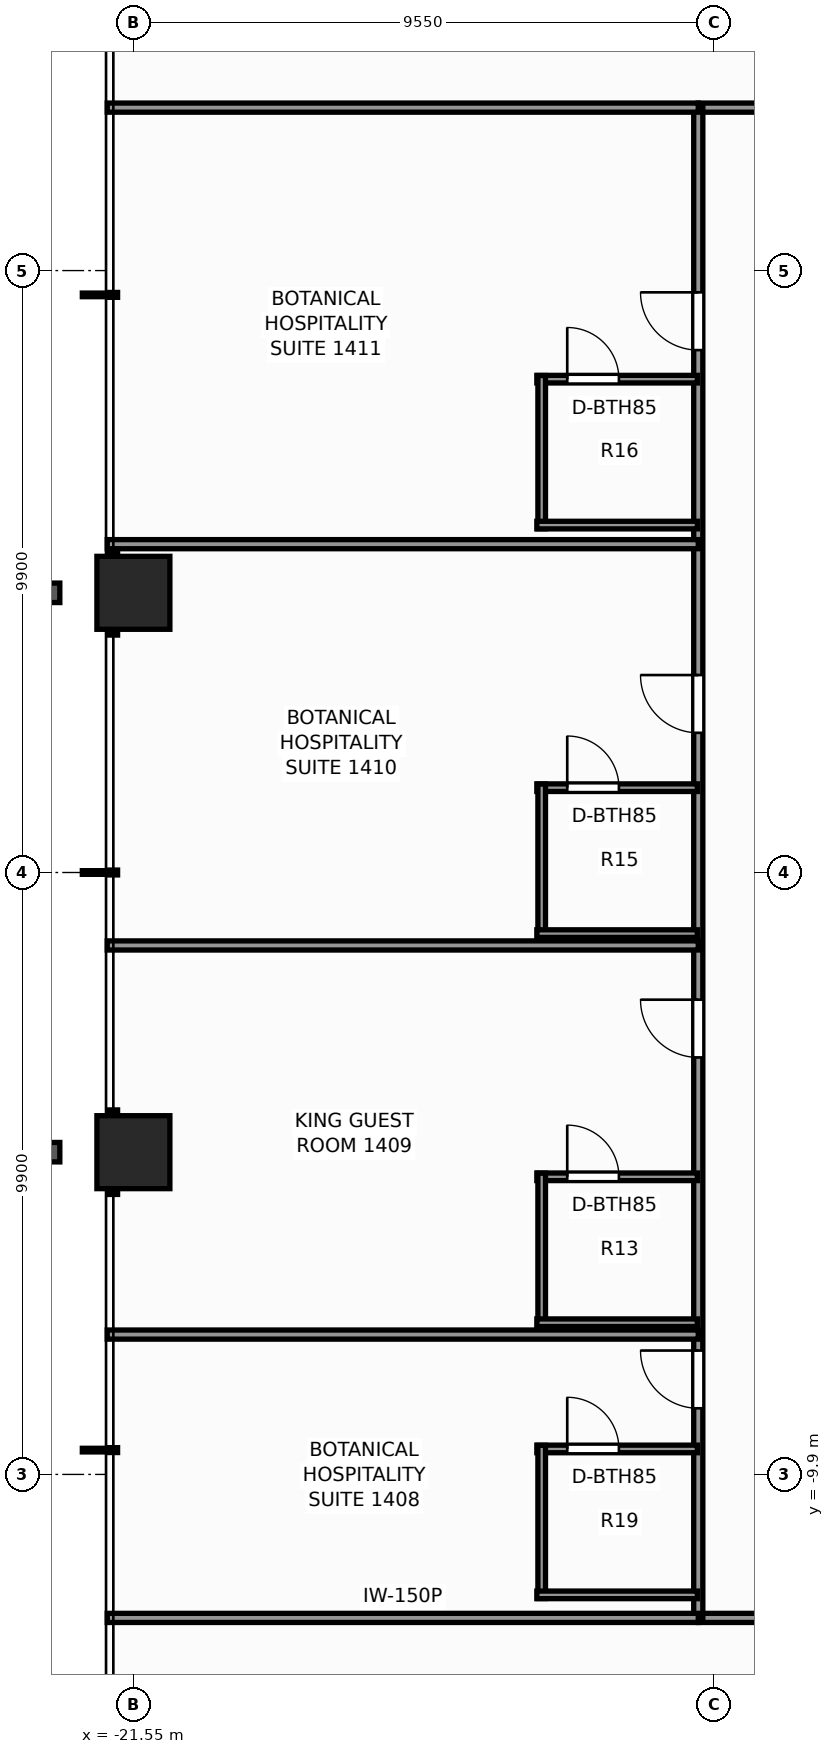
"""IFC4 building model, lengths in metres.
Left out: names, types, materials, properties, quantities, classifications, styles, units other than length and angle.
Written with IfcOpenShell. Run it as: python <this file> out.ifc"""

import sys

from ifc_helpers import new_model, si_unit, direction, frame, frame_2d, origin, origin_2d, place, context, subcontext, project, spatial, rectangle, extrude, element, fill, save


model = new_model("IFC4")
c1 = context("Model", 3, precision=1e-05, world=origin(), true_north=direction((0.0, 1.0)))
c2 = subcontext(c1, "Body", "Model", "MODEL_VIEW")
j1 = project(units=[si_unit("LENGTHUNIT", "METRE"), si_unit("PLANEANGLEUNIT", "RADIAN")], contexts=[c1])
p1 = place(None, origin())
s1 = spatial("IfcSite", under=j1, at=p1, CompositionType="ELEMENT")
p2 = place(p1, origin())
s2 = spatial("IfcBuilding", under=s1, at=p2, CompositionType="ELEMENT")
p3 = place(p2, frame((0.0, 0.0, 50.2)))
s3 = spatial("IfcBuildingStorey", under=s2, at=p3, CompositionType="ELEMENT", Elevation=50.2)
for number, where, z_axis, x_axis in (
    (1, (-21.55, -4.6, 0.0), (0.0, 0.0, 1.0), (1.0, 0.0, 0.0)),
    (2, (-21.55, 4.6, 0.0), (0.0, 0.0, 1.0), (1.0, 0.0, 0.0)),
):
    element("IfcColumn", number, at=place(p3, frame(where, z_axis=z_axis, x_axis=x_axis)), inside=s3, PredefinedType="COLUMN", context=c2, shape_type="SweptSolid", body=[
        extrude(rectangle(XDim=1.2, YDim=1.2, at=origin_2d()), origin(), (0.0, 0.0, 1.0), 3.3),
    ])
p4 = place(p3, frame((-12.26, -12.26, 0.0), z_axis=(0.0, 0.0, 1.0), x_axis=(1.0, 0.0, 0.0)))
e3 = element("IfcWall", 3, at=p4, inside=s3, PredefinedType="PARTITIONING", context=c2, shape_type="SweptSolid", body=[
    extrude(rectangle(XDim=24.84, YDim=0.15, at=frame_2d((12.42, 0.0))), origin(), (0.0, 0.0, 1.0), 2.272),
])
p5 = place(p4, frame((3.203, 0.0, 0.0)))
e4 = element("IfcOpeningElement", 4, at=p5, cuts=e3, PredefinedType="OPENING", context=c2, shape_type="SweptSolid", body=[
    extrude(rectangle(XDim=0.9, YDim=2.06, at=frame_2d((0.45, 1.03))), frame((0.0, 0.085, 0.0), z_axis=(0.0, -1.0, 0.0), x_axis=(1.0, 0.0, 0.0)), (0.0, 0.0, 1.0), 0.17),
])
p6 = place(p4, frame((5.628, 0.0, 0.0)))
e5 = element("IfcOpeningElement", 5, at=p6, cuts=e3, PredefinedType="OPENING", context=c2, shape_type="SweptSolid", body=[
    extrude(rectangle(XDim=0.9, YDim=2.06, at=frame_2d((0.45, 1.03))), frame((0.0, 0.085, 0.0), z_axis=(0.0, -1.0, 0.0), x_axis=(1.0, 0.0, 0.0)), (0.0, 0.0, 1.0), 0.17),
])
p7 = place(p4, frame((8.611, 0.0, 0.0)))
e6 = element("IfcOpeningElement", 6, at=p7, cuts=e3, PredefinedType="OPENING", context=c2, shape_type="SweptSolid", body=[
    extrude(rectangle(XDim=0.95, YDim=2.06, at=frame_2d((0.475, 1.03))), frame((0.0, 0.085, 0.0), z_axis=(0.0, -1.0, 0.0), x_axis=(1.0, 0.0, 0.0)), (0.0, 0.0, 1.0), 0.17),
])
p8 = place(p4, frame((13.84, 0.0, 0.0)))
e7 = element("IfcOpeningElement", 7, at=p8, cuts=e3, PredefinedType="OPENING", context=c2, shape_type="SweptSolid", body=[
    extrude(rectangle(XDim=0.9, YDim=2.06, at=frame_2d((0.45, 1.03))), frame((0.0, 0.085, 0.0), z_axis=(0.0, -1.0, 0.0), x_axis=(1.0, 0.0, 0.0)), (0.0, 0.0, 1.0), 0.17),
])
p9 = place(p4, frame((19.542, 0.0, 0.0)))
e8 = element("IfcOpeningElement", 8, at=p9, cuts=e3, PredefinedType="OPENING", context=c2, shape_type="SweptSolid", body=[
    extrude(rectangle(XDim=0.9, YDim=2.06, at=frame_2d((0.45, 1.03))), frame((0.0, 0.085, 0.0), z_axis=(0.0, -1.0, 0.0), x_axis=(1.0, 0.0, 0.0)), (0.0, 0.0, 1.0), 0.17),
])
p10 = place(p3, frame((-12.26, 12.58, 0.0), z_axis=(0.0, 0.0, 1.0), x_axis=(1.0, 0.0, 0.0)))
e9 = element("IfcWall", 9, at=p10, inside=s3, PredefinedType="PARTITIONING", context=c2, shape_type="SweptSolid", body=[
    extrude(rectangle(XDim=24.84, YDim=0.15, at=frame_2d((12.42, 0.0))), origin(), (0.0, 0.0, 1.0), 2.272),
])
p11 = place(p10, frame((3.462, 0.0, 0.0)))
e10 = element("IfcOpeningElement", 10, at=p11, cuts=e9, PredefinedType="OPENING", context=c2, shape_type="SweptSolid", body=[
    extrude(rectangle(XDim=0.9, YDim=2.06, at=frame_2d((0.45, 1.03))), frame((0.0, 0.085, 0.0), z_axis=(0.0, -1.0, 0.0), x_axis=(1.0, 0.0, 0.0)), (0.0, 0.0, 1.0), 0.17),
])
p12 = place(p10, frame((8.723, 0.0, 0.0)))
e11 = element("IfcOpeningElement", 11, at=p12, cuts=e9, PredefinedType="OPENING", context=c2, shape_type="SweptSolid", body=[
    extrude(rectangle(XDim=0.95, YDim=2.06, at=frame_2d((0.475, 1.03))), frame((0.0, 0.085, 0.0), z_axis=(0.0, -1.0, 0.0), x_axis=(1.0, 0.0, 0.0)), (0.0, 0.0, 1.0), 0.17),
])
p13 = place(p10, frame((14.157, 0.0, 0.0)))
e12 = element("IfcOpeningElement", 12, at=p13, cuts=e9, PredefinedType="OPENING", context=c2, shape_type="SweptSolid", body=[
    extrude(rectangle(XDim=0.95, YDim=2.06, at=frame_2d((0.475, 1.03))), frame((0.0, 0.085, 0.0), z_axis=(0.0, -1.0, 0.0), x_axis=(1.0, 0.0, 0.0)), (0.0, 0.0, 1.0), 0.17),
])
p14 = place(p10, frame((19.542, 0.0, 0.0)))
e13 = element("IfcOpeningElement", 13, at=p14, cuts=e9, PredefinedType="OPENING", context=c2, shape_type="SweptSolid", body=[
    extrude(rectangle(XDim=0.9, YDim=2.06, at=frame_2d((0.45, 1.03))), frame((0.0, 0.085, 0.0), z_axis=(0.0, -1.0, 0.0), x_axis=(1.0, 0.0, 0.0)), (0.0, 0.0, 1.0), 0.17),
])
p15 = place(p3, frame((-12.26, -12.26, 0.0), z_axis=(0.0, 0.0, 1.0), x_axis=(0.0, 1.0, 0.0)))
e14 = element("IfcWall", 14, at=p15, inside=s3, PredefinedType="PARTITIONING", context=c2, shape_type="SweptSolid", body=[
    extrude(rectangle(XDim=24.84, YDim=0.15, at=frame_2d((12.42, 0.0))), origin(), (0.0, 0.0, 1.0), 2.272),
])
p16 = place(p15, frame((3.448, 0.0, 0.0)))
e15 = element("IfcOpeningElement", 15, at=p16, cuts=e14, PredefinedType="OPENING", context=c2, shape_type="SweptSolid", body=[
    extrude(rectangle(XDim=0.95, YDim=2.06, at=frame_2d((0.475, 1.03))), frame((0.0, 0.085, 0.0), z_axis=(0.0, -1.0, 0.0), x_axis=(1.0, 0.0, 0.0)), (0.0, 0.0, 1.0), 0.17),
])
p17 = place(p15, frame((9.218, 0.0, 0.0)))
e16 = element("IfcOpeningElement", 16, at=p17, cuts=e14, PredefinedType="OPENING", context=c2, shape_type="SweptSolid", body=[
    extrude(rectangle(XDim=0.95, YDim=2.06, at=frame_2d((0.475, 1.03))), frame((0.0, 0.085, 0.0), z_axis=(0.0, -1.0, 0.0), x_axis=(1.0, 0.0, 0.0)), (0.0, 0.0, 1.0), 0.17),
])
p18 = place(p15, frame((14.558, 0.0, 0.0)))
e17 = element("IfcOpeningElement", 17, at=p18, cuts=e14, PredefinedType="OPENING", context=c2, shape_type="SweptSolid", body=[
    extrude(rectangle(XDim=0.95, YDim=2.06, at=frame_2d((0.475, 1.03))), frame((0.0, 0.085, 0.0), z_axis=(0.0, -1.0, 0.0), x_axis=(1.0, 0.0, 0.0)), (0.0, 0.0, 1.0), 0.17),
])
p19 = place(p15, frame((20.852, 0.0, 0.0)))
e18 = element("IfcOpeningElement", 18, at=p19, cuts=e14, PredefinedType="OPENING", context=c2, shape_type="SweptSolid", body=[
    extrude(rectangle(XDim=0.95, YDim=2.06, at=frame_2d((0.475, 1.03))), frame((0.0, 0.085, 0.0), z_axis=(0.0, -1.0, 0.0), x_axis=(1.0, 0.0, 0.0)), (0.0, 0.0, 1.0), 0.17),
])
for number, where, z_axis, x_axis in (
    (19, (-21.98, -12.26, 0.0), (0.0, 0.0, 1.0), (1.0, 0.0, 0.0)),
    (20, (-21.98, 12.58, 0.0), (0.0, 0.0, 1.0), (1.0, 0.0, 0.0)),
):
    element("IfcWall", number, at=place(p3, frame(where, z_axis=z_axis, x_axis=x_axis)), inside=s3, PredefinedType="PARTITIONING", context=c2, shape_type="SweptSolid", body=[
        extrude(rectangle(XDim=9.72, YDim=0.15, at=frame_2d((4.86, 0.0))), origin(), (0.0, 0.0, 1.0), 2.272),
    ])
p20 = place(p3, frame((-21.98, -7.6, 0.0), z_axis=(0.0, 0.0, 1.0), x_axis=(1.0, 0.0, 0.0)))
e21 = element("IfcWall", 21, at=p20, inside=s3, PredefinedType="PARTITIONING", context=c2, shape_type="SweptSolid", body=[
    extrude(rectangle(XDim=9.72, YDim=0.15, at=frame_2d((4.86, 0.0))), origin(), (0.0, 0.0, 1.0), 2.429),
])
p21 = place(p3, frame((-14.915, -9.481, 0.0), z_axis=(0.0, 0.0, 1.0), x_axis=(1.0, 0.0, 0.0)))
e22 = element("IfcWall", 22, at=p21, inside=s3, PredefinedType="PARTITIONING", context=c2, shape_type="SweptSolid", body=[
    extrude(rectangle(XDim=2.64, YDim=0.125, at=frame_2d((1.32, 0.0))), origin(), (0.0, 0.0, 1.0), 3.06),
])
p22 = place(p21, frame((0.5, 0.0, 0.0)))
e23 = element("IfcOpeningElement", 23, at=p22, cuts=e22, PredefinedType="OPENING", context=c2, shape_type="SweptSolid", body=[
    extrude(rectangle(XDim=0.85, YDim=2.03, at=frame_2d((0.425, 1.015))), frame((0.0, 0.073, 0.0), z_axis=(0.0, -1.0, 0.0), x_axis=(1.0, 0.0, 0.0)), (0.0, 0.0, 1.0), 0.145),
])
p23 = place(p3, frame((-14.835, -11.941, 0.0), z_axis=(0.0, 0.0, 1.0), x_axis=(0.0, 1.0, 0.0)))
e24 = element("IfcWall", 24, at=p23, inside=s3, PredefinedType="PARTITIONING", context=c2, shape_type="SweptSolid", body=[
    extrude(rectangle(XDim=2.52, YDim=0.125, at=frame_2d((1.26, 0.0))), origin(), (0.0, 0.0, 1.0), 2.272),
])
p24 = place(p3, frame((-14.915, -11.881, 0.0), z_axis=(0.0, 0.0, 1.0), x_axis=(1.0, 0.0, 0.0)))
e25 = element("IfcWall", 25, at=p24, inside=s3, PredefinedType="PARTITIONING", context=c2, shape_type="SweptSolid", body=[
    extrude(rectangle(XDim=2.64, YDim=0.125, at=frame_2d((1.32, 0.0))), origin(), (0.0, 0.0, 1.0), 2.272),
])
p25 = place(p3, frame((-21.98, -1.2, 0.0), z_axis=(0.0, 0.0, 1.0), x_axis=(1.0, 0.0, 0.0)))
e26 = element("IfcWall", 26, at=p25, inside=s3, PredefinedType="PARTITIONING", context=c2, shape_type="SweptSolid", body=[
    extrude(rectangle(XDim=9.72, YDim=0.15, at=frame_2d((4.86, 0.0))), origin(), (0.0, 0.0, 1.0), 2.429),
])
p26 = place(p3, frame((-14.915, -5.005, 0.0), z_axis=(0.0, 0.0, 1.0), x_axis=(1.0, 0.0, 0.0)))
e27 = element("IfcWall", 27, at=p26, inside=s3, PredefinedType="PARTITIONING", context=c2, shape_type="SweptSolid", body=[
    extrude(rectangle(XDim=2.64, YDim=0.125, at=frame_2d((1.32, 0.0))), origin(), (0.0, 0.0, 1.0), 3.06),
])
p27 = place(p26, frame((0.5, 0.0, 0.0)))
e28 = element("IfcOpeningElement", 28, at=p27, cuts=e27, PredefinedType="OPENING", context=c2, shape_type="SweptSolid", body=[
    extrude(rectangle(XDim=0.85, YDim=2.03, at=frame_2d((0.425, 1.015))), frame((0.0, 0.073, 0.0), z_axis=(0.0, -1.0, 0.0), x_axis=(1.0, 0.0, 0.0)), (0.0, 0.0, 1.0), 0.145),
])
p28 = place(p3, frame((-14.835, -7.465, 0.0), z_axis=(0.0, 0.0, 1.0), x_axis=(0.0, 1.0, 0.0)))
e29 = element("IfcWall", 29, at=p28, inside=s3, PredefinedType="PARTITIONING", context=c2, shape_type="SweptSolid", body=[
    extrude(rectangle(XDim=2.52, YDim=0.125, at=frame_2d((1.26, 0.0))), origin(), (0.0, 0.0, 1.0), 3.06),
])
p29 = place(p3, frame((-14.915, -7.405, 0.0), z_axis=(0.0, 0.0, 1.0), x_axis=(1.0, 0.0, 0.0)))
e30 = element("IfcWall", 30, at=p29, inside=s3, PredefinedType="PARTITIONING", context=c2, shape_type="SweptSolid", body=[
    extrude(rectangle(XDim=2.64, YDim=0.125, at=frame_2d((1.32, 0.0))), origin(), (0.0, 0.0, 1.0), 3.06),
])
p30 = place(p3, frame((-21.98, 5.4, 0.0), z_axis=(0.0, 0.0, 1.0), x_axis=(1.0, 0.0, 0.0)))
e31 = element("IfcWall", 31, at=p30, inside=s3, PredefinedType="PARTITIONING", context=c2, shape_type="SweptSolid", body=[
    extrude(rectangle(XDim=9.72, YDim=0.15, at=frame_2d((4.86, 0.0))), origin(), (0.0, 0.0, 1.0), 2.429),
])
p31 = place(p3, frame((-14.915, 1.395, 0.0), z_axis=(0.0, 0.0, 1.0), x_axis=(1.0, 0.0, 0.0)))
e32 = element("IfcWall", 32, at=p31, inside=s3, PredefinedType="PARTITIONING", context=c2, shape_type="SweptSolid", body=[
    extrude(rectangle(XDim=2.64, YDim=0.125, at=frame_2d((1.32, 0.0))), origin(), (0.0, 0.0, 1.0), 3.06),
])
p32 = place(p31, frame((0.5, 0.0, 0.0)))
e33 = element("IfcOpeningElement", 33, at=p32, cuts=e32, PredefinedType="OPENING", context=c2, shape_type="SweptSolid", body=[
    extrude(rectangle(XDim=0.85, YDim=2.03, at=frame_2d((0.425, 1.015))), frame((0.0, 0.073, 0.0), z_axis=(0.0, -1.0, 0.0), x_axis=(1.0, 0.0, 0.0)), (0.0, 0.0, 1.0), 0.145),
])
p33 = place(p3, frame((-14.835, -1.065, 0.0), z_axis=(0.0, 0.0, 1.0), x_axis=(0.0, 1.0, 0.0)))
e34 = element("IfcWall", 34, at=p33, inside=s3, PredefinedType="PARTITIONING", context=c2, shape_type="SweptSolid", body=[
    extrude(rectangle(XDim=2.52, YDim=0.125, at=frame_2d((1.26, 0.0))), origin(), (0.0, 0.0, 1.0), 2.585),
])
p34 = place(p3, frame((-14.915, -1.005, 0.0), z_axis=(0.0, 0.0, 1.0), x_axis=(1.0, 0.0, 0.0)))
e35 = element("IfcWall", 35, at=p34, inside=s3, PredefinedType="PARTITIONING", context=c2, shape_type="SweptSolid", body=[
    extrude(rectangle(XDim=2.64, YDim=0.125, at=frame_2d((1.32, 0.0))), origin(), (0.0, 0.0, 1.0), 3.06),
])
p35 = place(p3, frame((-14.915, 8.114, 0.0), z_axis=(0.0, 0.0, 1.0), x_axis=(1.0, 0.0, 0.0)))
e36 = element("IfcWall", 36, at=p35, inside=s3, PredefinedType="PARTITIONING", context=c2, shape_type="SweptSolid", body=[
    extrude(rectangle(XDim=2.64, YDim=0.125, at=frame_2d((1.32, 0.0))), origin(), (0.0, 0.0, 1.0), 3.06),
])
p36 = place(p35, frame((0.5, 0.0, 0.0)))
e37 = element("IfcOpeningElement", 37, at=p36, cuts=e36, PredefinedType="OPENING", context=c2, shape_type="SweptSolid", body=[
    extrude(rectangle(XDim=0.85, YDim=2.03, at=frame_2d((0.425, 1.015))), frame((0.0, 0.073, 0.0), z_axis=(0.0, -1.0, 0.0), x_axis=(1.0, 0.0, 0.0)), (0.0, 0.0, 1.0), 0.145),
])
p37 = place(p3, frame((-14.835, 5.654, 0.0), z_axis=(0.0, 0.0, 1.0), x_axis=(0.0, 1.0, 0.0)))
e38 = element("IfcWall", 38, at=p37, inside=s3, PredefinedType="PARTITIONING", context=c2, shape_type="SweptSolid", body=[
    extrude(rectangle(XDim=2.52, YDim=0.125, at=frame_2d((1.26, 0.0))), origin(), (0.0, 0.0, 1.0), 3.06),
])
p38 = place(p3, frame((-14.915, 5.714, 0.0), z_axis=(0.0, 0.0, 1.0), x_axis=(1.0, 0.0, 0.0)))
e39 = element("IfcWall", 39, at=p38, inside=s3, PredefinedType="PARTITIONING", context=c2, shape_type="SweptSolid", body=[
    extrude(rectangle(XDim=2.64, YDim=0.125, at=frame_2d((1.32, 0.0))), origin(), (0.0, 0.0, 1.0), 3.06),
])
p39 = place(p22, origin())
e40 = element("IfcDoor", 40, at=p39, inside=s3, OperationType="SINGLE_SWING_LEFT", PredefinedType="DOOR", context=c2, shape_type="SweptSolid", body=[
    extrude(rectangle(XDim=0.85, YDim=2.03, at=frame_2d((0.425, 1.015))), frame((0.0, 0.025, 0.0), z_axis=(0.0, -1.0, 0.0), x_axis=(1.0, 0.0, 0.0)), (0.0, 0.0, 1.0), 0.05),
])
fill(e23, e40)
p40 = place(p16, origin())
e41 = element("IfcDoor", 41, at=p40, inside=s3, OperationType="SINGLE_SWING_RIGHT", PredefinedType="DOOR", context=c2, shape_type="SweptSolid", body=[
    extrude(rectangle(XDim=0.95, YDim=2.06, at=frame_2d((0.475, 1.03))), frame((0.0, 0.025, 0.0), z_axis=(0.0, -1.0, 0.0), x_axis=(1.0, 0.0, 0.0)), (0.0, 0.0, 1.0), 0.05),
])
fill(e15, e41)
p41 = place(p27, origin())
e42 = element("IfcDoor", 42, at=p41, inside=s3, OperationType="SINGLE_SWING_LEFT", PredefinedType="DOOR", context=c2, shape_type="SweptSolid", body=[
    extrude(rectangle(XDim=0.85, YDim=2.03, at=frame_2d((0.425, 1.015))), frame((0.0, 0.025, 0.0), z_axis=(0.0, -1.0, 0.0), x_axis=(1.0, 0.0, 0.0)), (0.0, 0.0, 1.0), 0.05),
])
fill(e28, e42)
p42 = place(p17, origin())
e43 = element("IfcDoor", 43, at=p42, inside=s3, OperationType="SINGLE_SWING_RIGHT", PredefinedType="DOOR", context=c2, shape_type="SweptSolid", body=[
    extrude(rectangle(XDim=0.95, YDim=2.06, at=frame_2d((0.475, 1.03))), frame((0.0, 0.025, 0.0), z_axis=(0.0, -1.0, 0.0), x_axis=(1.0, 0.0, 0.0)), (0.0, 0.0, 1.0), 0.05),
])
fill(e16, e43)
p43 = place(p32, origin())
e44 = element("IfcDoor", 44, at=p43, inside=s3, OperationType="SINGLE_SWING_LEFT", PredefinedType="DOOR", context=c2, shape_type="SweptSolid", body=[
    extrude(rectangle(XDim=0.85, YDim=2.03, at=frame_2d((0.425, 1.015))), frame((0.0, 0.025, 0.0), z_axis=(0.0, -1.0, 0.0), x_axis=(1.0, 0.0, 0.0)), (0.0, 0.0, 1.0), 0.05),
])
fill(e33, e44)
p44 = place(p18, origin())
e45 = element("IfcDoor", 45, at=p44, inside=s3, OperationType="SINGLE_SWING_RIGHT", PredefinedType="DOOR", context=c2, shape_type="SweptSolid", body=[
    extrude(rectangle(XDim=0.95, YDim=2.06, at=frame_2d((0.475, 1.03))), frame((0.0, 0.025, 0.0), z_axis=(0.0, -1.0, 0.0), x_axis=(1.0, 0.0, 0.0)), (0.0, 0.0, 1.0), 0.05),
])
fill(e17, e45)
p45 = place(p36, origin())
e46 = element("IfcDoor", 46, at=p45, inside=s3, OperationType="SINGLE_SWING_LEFT", PredefinedType="DOOR", context=c2, shape_type="SweptSolid", body=[
    extrude(rectangle(XDim=0.85, YDim=2.03, at=frame_2d((0.425, 1.015))), frame((0.0, 0.025, 0.0), z_axis=(0.0, -1.0, 0.0), x_axis=(1.0, 0.0, 0.0)), (0.0, 0.0, 1.0), 0.05),
])
fill(e37, e46)
p46 = place(p19, origin())
e47 = element("IfcDoor", 47, at=p46, inside=s3, OperationType="SINGLE_SWING_RIGHT", PredefinedType="DOOR", context=c2, shape_type="SweptSolid", body=[
    extrude(rectangle(XDim=0.95, YDim=2.06, at=frame_2d((0.475, 1.03))), frame((0.0, 0.025, 0.0), z_axis=(0.0, -1.0, 0.0), x_axis=(1.0, 0.0, 0.0)), (0.0, 0.0, 1.0), 0.05),
])
fill(e18, e47)
save(model, sys.argv[1])
